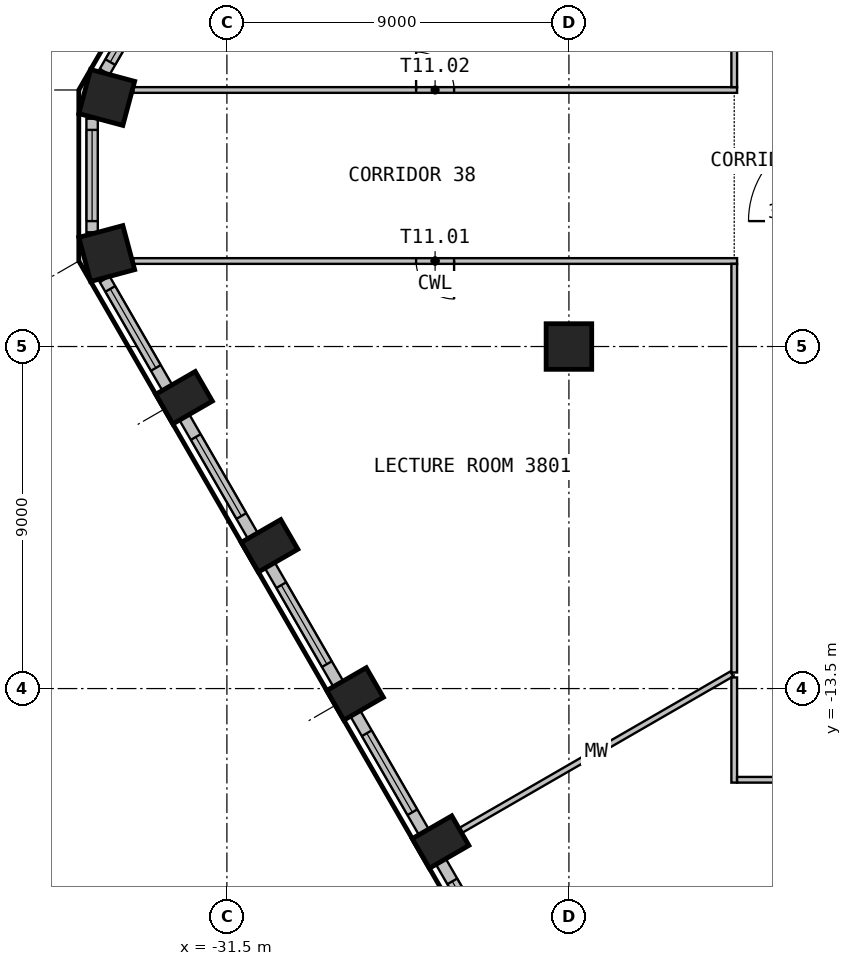
"""IFC4 building model, lengths in metres.
Left out: names, types, materials, properties, quantities, classifications, styles, units other than length and angle.
Written with IfcOpenShell. Run it as: python <this file> out.ifc"""

import sys

from ifc_helpers import new_model, si_unit, direction, frame, frame_2d, origin, origin_2d, place, context, subcontext, project, spatial, rectangle, circle, extrude, element, fill, save


model = new_model("IFC4")
c1 = context("Model", 3, precision=1e-05, world=origin(), true_north=direction((0.0, 1.0)))
c2 = subcontext(c1, "Body", "Model", "MODEL_VIEW")
j1 = project(units=[si_unit("LENGTHUNIT", "METRE"), si_unit("PLANEANGLEUNIT", "RADIAN")], contexts=[c1])
p1 = place(None, origin())
s1 = spatial("IfcSite", under=j1, at=p1, CompositionType="ELEMENT")
p2 = place(p1, origin())
s2 = spatial("IfcBuilding", under=s1, at=p2, CompositionType="ELEMENT")
p3 = place(p2, frame((0.0, 0.0, 156.0)))
s3 = spatial("IfcBuildingStorey", under=s2, at=p3, CompositionType="ELEMENT", Elevation=156.0)
for number, where, z_axis, x_axis in (
    (1, (-34.662, 2.053, 0.0), (0.0, 0.0, 1.0), (-0.259, -0.966, 0.0)),
    (2, (-34.662, -2.053, 0.0), (0.0, 0.0, 1.0), (0.259, -0.966, 0.0)),
):
    element("IfcColumn", number, at=place(p3, frame(where, z_axis=z_axis, x_axis=x_axis)), inside=s3, PredefinedType="COLUMN", context=c2, shape_type="SweptSolid", body=[
        extrude(rectangle(XDim=1.2, YDim=1.2, at=origin_2d()), origin(), (0.0, 0.0, 1.0), 3.575),
    ])
for number, where, z_axis, x_axis in (
    (3, (-32.627, -5.847, 0.0), (0.0, 0.0, 1.0), (0.5, -0.866, 0.0)),
    (4, (-30.377, -9.744, 0.0), (0.0, 0.0, 1.0), (0.5, -0.866, 0.0)),
    (5, (-28.127, -13.641, 0.0), (0.0, 0.0, 1.0), (0.5, -0.866, 0.0)),
    (6, (-25.877, -17.539, 0.0), (0.0, 0.0, 1.0), (0.5, -0.866, 0.0)),
):
    element("IfcColumn", number, at=place(p3, frame(where, z_axis=z_axis, x_axis=x_axis)), inside=s3, PredefinedType="COLUMN", context=c2, shape_type="SweptSolid", body=[
        extrude(rectangle(XDim=0.9, YDim=1.2, at=origin_2d()), origin(), (0.0, 0.0, 1.0), 3.575),
    ])
p4 = place(p3, frame((-22.5, -4.5, 0.0), z_axis=(0.0, 0.0, 1.0), x_axis=(1.0, 0.0, 0.0)))
e7 = element("IfcColumn", 7, at=p4, inside=s3, PredefinedType="COLUMN", context=c2, shape_type="SweptSolid", body=[
    extrude(circle(Radius=0.6, at=origin_2d()), origin(), (0.0, 0.0, 1.0), 3.575),
])
p5 = place(p3, frame((-33.069, 5.582, 0.0), z_axis=(0.0, 0.0, 1.0), x_axis=(-0.499981217486, -0.866036247602, 0.0)))
e8 = element("IfcWall", 8, at=p5, inside=s3, PredefinedType="SOLIDWALL", context=c2, shape_type="SweptSolid", body=[
    extrude(rectangle(XDim=3.294, YDim=0.3, at=frame_2d((1.647, 0.0))), origin(), (0.0, 0.0, 1.0), 3.575),
])
p6 = place(p5, frame((0.6, 0.0, 0.9)))
e9 = element("IfcOpeningElement", 9, at=p6, cuts=e8, PredefinedType="OPENING", context=c2, shape_type="SweptSolid", body=[
    extrude(rectangle(XDim=2.4, YDim=2.1, at=frame_2d((1.2, 1.05))), frame((0.0, 0.16, 0.0), z_axis=(0.0, -1.0, 0.0), x_axis=(1.0, 0.0, 0.0)), (0.0, 0.0, 1.0), 0.32),
])
p7 = place(p3, frame((-35.047, 1.495, 0.0), z_axis=(0.0, 0.0, 1.0), x_axis=(0.0, -1.0, 0.0)))
e10 = element("IfcWall", 10, at=p7, inside=s3, PredefinedType="SOLIDWALL", context=c2, shape_type="SweptSolid", body=[
    extrude(rectangle(XDim=2.989, YDim=0.3, at=frame_2d((1.495, 0.0))), origin(), (0.0, 0.0, 1.0), 3.575),
])
p8 = place(p7, frame((0.295, 0.0, 0.9)))
e11 = element("IfcOpeningElement", 11, at=p8, cuts=e10, PredefinedType="OPENING", context=c2, shape_type="SweptSolid", body=[
    extrude(rectangle(XDim=2.4, YDim=2.1, at=frame_2d((1.2, 1.05))), frame((0.0, 0.16, 0.0), z_axis=(0.0, -1.0, 0.0), x_axis=(1.0, 0.0, 0.0)), (0.0, 0.0, 1.0), 0.32),
])
p9 = place(p3, frame((-34.716, -2.729, 0.0), z_axis=(0.0, 0.0, 1.0), x_axis=(0.499981217486, -0.866036247602, 0.0)))
e12 = element("IfcWall", 12, at=p9, inside=s3, PredefinedType="SOLIDWALL", context=c2, shape_type="SweptSolid", body=[
    extrude(rectangle(XDim=3.294, YDim=0.3, at=frame_2d((1.647, 0.0))), origin(), (0.0, 0.0, 1.0), 3.575),
])
p10 = place(p9, frame((0.295, 0.0, 0.9)))
e13 = element("IfcOpeningElement", 13, at=p10, cuts=e12, PredefinedType="OPENING", context=c2, shape_type="SweptSolid", body=[
    extrude(rectangle(XDim=2.4, YDim=2.1, at=frame_2d((1.2, 1.05))), frame((0.0, 0.16, 0.0), z_axis=(0.0, -1.0, 0.0), x_axis=(1.0, 0.0, 0.0)), (0.0, 0.0, 1.0), 0.32),
])
p11 = place(p3, frame((-32.619, -6.362, 0.0), z_axis=(0.0, 0.0, 1.0), x_axis=(0.500027802648, -0.866009351323, 0.0)))
e14 = element("IfcWall", 14, at=p11, inside=s3, PredefinedType="SOLIDWALL", context=c2, shape_type="SweptSolid", body=[
    extrude(rectangle(XDim=3.599, YDim=0.3, at=frame_2d((1.799, 0.0))), origin(), (0.0, 0.0, 1.0), 3.575),
])
p12 = place(p11, frame((0.6, 0.0, 0.9)))
e15 = element("IfcOpeningElement", 15, at=p12, cuts=e14, PredefinedType="OPENING", context=c2, shape_type="SweptSolid", body=[
    extrude(rectangle(XDim=2.4, YDim=2.1, at=frame_2d((1.2, 1.05))), frame((0.0, 0.16, 0.0), z_axis=(0.0, -1.0, 0.0), x_axis=(1.0, 0.0, 0.0)), (0.0, 0.0, 1.0), 0.32),
])
p13 = place(p3, frame((-30.369, -10.26, 0.0), z_axis=(0.0, 0.0, 1.0), x_axis=(0.500027802648, -0.866009351323, 0.0)))
e16 = element("IfcWall", 16, at=p13, inside=s3, PredefinedType="SOLIDWALL", context=c2, shape_type="SweptSolid", body=[
    extrude(rectangle(XDim=3.599, YDim=0.3, at=frame_2d((1.799, 0.0))), origin(), (0.0, 0.0, 1.0), 3.575),
])
p14 = place(p13, frame((0.6, 0.0, 0.9)))
e17 = element("IfcOpeningElement", 17, at=p14, cuts=e16, PredefinedType="OPENING", context=c2, shape_type="SweptSolid", body=[
    extrude(rectangle(XDim=2.4, YDim=2.1, at=frame_2d((1.2, 1.05))), frame((0.0, 0.16, 0.0), z_axis=(0.0, -1.0, 0.0), x_axis=(1.0, 0.0, 0.0)), (0.0, 0.0, 1.0), 0.32),
])
p15 = place(p3, frame((-28.119, -14.156, 0.0), z_axis=(0.0, 0.0, 1.0), x_axis=(0.500027802648, -0.866009351323, 0.0)))
e18 = element("IfcWall", 18, at=p15, inside=s3, PredefinedType="SOLIDWALL", context=c2, shape_type="SweptSolid", body=[
    extrude(rectangle(XDim=3.599, YDim=0.3, at=frame_2d((1.799, 0.0))), origin(), (0.0, 0.0, 1.0), 3.575),
])
p16 = place(p15, frame((0.6, 0.0, 0.9)))
e19 = element("IfcOpeningElement", 19, at=p16, cuts=e18, PredefinedType="OPENING", context=c2, shape_type="SweptSolid", body=[
    extrude(rectangle(XDim=2.4, YDim=2.1, at=frame_2d((1.2, 1.05))), frame((0.0, 0.16, 0.0), z_axis=(0.0, -1.0, 0.0), x_axis=(1.0, 0.0, 0.0)), (0.0, 0.0, 1.0), 0.32),
])
p17 = place(p3, frame((-25.869, -18.054, 0.0), z_axis=(0.0, 0.0, 1.0), x_axis=(0.500027802648, -0.866009351323, 0.0)))
e20 = element("IfcWall", 20, at=p17, inside=s3, PredefinedType="SOLIDWALL", context=c2, shape_type="SweptSolid", body=[
    extrude(rectangle(XDim=3.599, YDim=0.3, at=frame_2d((1.799, 0.0))), origin(), (0.0, 0.0, 1.0), 3.575),
])
p18 = place(p17, frame((0.6, 0.0, 0.9)))
e21 = element("IfcOpeningElement", 21, at=p18, cuts=e20, PredefinedType="OPENING", context=c2, shape_type="SweptSolid", body=[
    extrude(rectangle(XDim=2.4, YDim=2.1, at=frame_2d((1.2, 1.05))), frame((0.0, 0.16, 0.0), z_axis=(0.0, -1.0, 0.0), x_axis=(1.0, 0.0, 0.0)), (0.0, 0.0, 1.0), 0.32),
])
p19 = place(p3, frame((-18.075, -2.25, 0.0), z_axis=(0.0, 0.0, 1.0), x_axis=(-1.0, 0.0, 0.0)))
e22 = element("IfcWall", 22, at=p19, inside=s3, PredefinedType="PARTITIONING", context=c2, shape_type="SweptSolid", body=[
    extrude(rectangle(XDim=15.893, YDim=0.15, at=frame_2d((7.946, 0.0))), origin(), (0.0, 0.0, 1.0), 3.575),
])
p20 = place(p19, frame((7.446, 0.0, 0.0)))
e23 = element("IfcOpeningElement", 23, at=p20, cuts=e22, PredefinedType="OPENING", context=c2, shape_type="SweptSolid", body=[
    extrude(rectangle(XDim=1.0, YDim=2.1, at=frame_2d((0.5, 1.05))), frame((0.0, 0.085, 0.0), z_axis=(0.0, -1.0, 0.0), x_axis=(1.0, 0.0, 0.0)), (0.0, 0.0, 1.0), 0.17),
])
p21 = place(p3, frame((-33.968, 2.25, 0.0), z_axis=(0.0, 0.0, 1.0), x_axis=(1.0, 0.0, 0.0)))
e24 = element("IfcWall", 24, at=p21, inside=s3, PredefinedType="PARTITIONING", context=c2, shape_type="SweptSolid", body=[
    extrude(rectangle(XDim=15.893, YDim=0.15, at=frame_2d((7.946, 0.0))), origin(), (0.0, 0.0, 1.0), 3.575),
])
p22 = place(p21, frame((7.446, 0.0, 0.0)))
e25 = element("IfcOpeningElement", 25, at=p22, cuts=e24, PredefinedType="OPENING", context=c2, shape_type="SweptSolid", body=[
    extrude(rectangle(XDim=1.0, YDim=2.1, at=frame_2d((0.5, 1.05))), frame((0.0, 0.085, 0.0), z_axis=(0.0, -1.0, 0.0), x_axis=(1.0, 0.0, 0.0)), (0.0, 0.0, 1.0), 0.17),
])
p23 = place(p3, frame((-18.215, -13.115, 0.0), z_axis=(0.0, 0.0, 1.0), x_axis=(-0.866039823271, -0.499975023885, 0.0)))
e26 = element("IfcWall", 26, at=p23, inside=s3, PredefinedType="MOVABLE", context=c2, shape_type="SweptSolid", body=[
    extrude(rectangle(XDim=8.228, YDim=0.15, at=frame_2d((4.114, 0.0))), origin(), (0.0, 0.0, 1.0), 3.575),
])
p24 = place(p3, frame((-12.217, -15.953, 0.0), z_axis=(0.0, 0.0, 1.0), x_axis=(-0.707096863632, -0.707116698602, 0.0)))
e27 = element("IfcWall", 27, at=p24, inside=s3, PredefinedType="MOVABLE", context=c2, shape_type="SweptSolid", body=[
    extrude(rectangle(XDim=12.309, YDim=0.15, at=frame_2d((6.154, 0.0))), origin(), (0.0, 0.0, 1.0), 3.575),
])
p25 = place(p3, frame((-18.15, -13.207, 0.0), z_axis=(0.0, 0.0, 1.0), x_axis=(0.0, -1.0, 0.0)))
e28 = element("IfcWall", 28, at=p25, inside=s3, PredefinedType="PARTITIONING", context=c2, shape_type="SweptSolid", body=[
    extrude(rectangle(XDim=2.768, YDim=0.15, at=frame_2d((1.384, 0.0))), origin(), (0.0, 0.0, 1.0), 3.575),
])
p26 = place(p3, frame((-18.075, -15.9, 0.0), z_axis=(0.0, 0.0, 1.0), x_axis=(1.0, 0.0, 0.0)))
e29 = element("IfcWall", 29, at=p26, inside=s3, PredefinedType="PARTITIONING", context=c2, shape_type="SweptSolid", body=[
    extrude(rectangle(XDim=5.736, YDim=0.15, at=frame_2d((2.868, 0.0))), origin(), (0.0, 0.0, 1.0), 3.575),
])
p27 = place(p26, frame((2.368, 0.0, 0.0)))
e30 = element("IfcOpeningElement", 30, at=p27, cuts=e29, PredefinedType="OPENING", context=c2, shape_type="SweptSolid", body=[
    extrude(rectangle(XDim=1.0, YDim=2.1, at=frame_2d((0.5, 1.05))), frame((0.0, 0.085, 0.0), z_axis=(0.0, -1.0, 0.0), x_axis=(1.0, 0.0, 0.0)), (0.0, 0.0, 1.0), 0.17),
])
p28 = place(p3, frame((-18.15, -2.325, 0.0), z_axis=(0.0, 0.0, 1.0), x_axis=(0.0, -1.0, 0.0)))
e31 = element("IfcWall", 31, at=p28, inside=s3, PredefinedType="PARTITIONING", context=c2, shape_type="SweptSolid", body=[
    extrude(rectangle(XDim=10.752, YDim=0.15, at=frame_2d((5.376, 0.0))), origin(), (0.0, 0.0, 1.0), 3.575),
])
p29 = place(p3, frame((-18.15, 15.975, 0.0), z_axis=(0.0, 0.0, 1.0), x_axis=(0.0, -1.0, 0.0)))
e32 = element("IfcWall", 32, at=p29, inside=s3, PredefinedType="PARTITIONING", context=c2, shape_type="SweptSolid", body=[
    extrude(rectangle(XDim=13.65, YDim=0.15, at=frame_2d((6.825, 0.0))), origin(), (0.0, 0.0, 1.0), 3.575),
])
p30 = place(p6, origin())
e33 = element("IfcWindow", 33, at=p30, inside=s3, PartitioningType="SINGLE_PANEL", PredefinedType="WINDOW", context=c2, shape_type="SweptSolid", body=[
    extrude(rectangle(XDim=2.4, YDim=2.1, at=frame_2d((1.2, 1.05))), frame((0.0, 0.03, 0.0), z_axis=(0.0, -1.0, 0.0), x_axis=(1.0, 0.0, 0.0)), (0.0, 0.0, 1.0), 0.06),
])
fill(e9, e33)
p31 = place(p8, origin())
e34 = element("IfcWindow", 34, at=p31, inside=s3, PartitioningType="SINGLE_PANEL", PredefinedType="WINDOW", context=c2, shape_type="SweptSolid", body=[
    extrude(rectangle(XDim=2.4, YDim=2.1, at=frame_2d((1.2, 1.05))), frame((0.0, 0.03, 0.0), z_axis=(0.0, -1.0, 0.0), x_axis=(1.0, 0.0, 0.0)), (0.0, 0.0, 1.0), 0.06),
])
fill(e11, e34)
p32 = place(p10, origin())
e35 = element("IfcWindow", 35, at=p32, inside=s3, PartitioningType="SINGLE_PANEL", PredefinedType="WINDOW", context=c2, shape_type="SweptSolid", body=[
    extrude(rectangle(XDim=2.4, YDim=2.1, at=frame_2d((1.2, 1.05))), frame((0.0, 0.03, 0.0), z_axis=(0.0, -1.0, 0.0), x_axis=(1.0, 0.0, 0.0)), (0.0, 0.0, 1.0), 0.06),
])
fill(e13, e35)
p33 = place(p12, origin())
e36 = element("IfcWindow", 36, at=p33, inside=s3, PartitioningType="SINGLE_PANEL", PredefinedType="WINDOW", context=c2, shape_type="SweptSolid", body=[
    extrude(rectangle(XDim=2.4, YDim=2.1, at=frame_2d((1.2, 1.05))), frame((0.0, 0.03, 0.0), z_axis=(0.0, -1.0, 0.0), x_axis=(1.0, 0.0, 0.0)), (0.0, 0.0, 1.0), 0.06),
])
fill(e15, e36)
p34 = place(p14, origin())
e37 = element("IfcWindow", 37, at=p34, inside=s3, PartitioningType="SINGLE_PANEL", PredefinedType="WINDOW", context=c2, shape_type="SweptSolid", body=[
    extrude(rectangle(XDim=2.4, YDim=2.1, at=frame_2d((1.2, 1.05))), frame((0.0, 0.03, 0.0), z_axis=(0.0, -1.0, 0.0), x_axis=(1.0, 0.0, 0.0)), (0.0, 0.0, 1.0), 0.06),
])
fill(e17, e37)
p35 = place(p16, origin())
e38 = element("IfcWindow", 38, at=p35, inside=s3, PartitioningType="SINGLE_PANEL", PredefinedType="WINDOW", context=c2, shape_type="SweptSolid", body=[
    extrude(rectangle(XDim=2.4, YDim=2.1, at=frame_2d((1.2, 1.05))), frame((0.0, 0.03, 0.0), z_axis=(0.0, -1.0, 0.0), x_axis=(1.0, 0.0, 0.0)), (0.0, 0.0, 1.0), 0.06),
])
fill(e19, e38)
p36 = place(p18, origin())
e39 = element("IfcWindow", 39, at=p36, inside=s3, PartitioningType="SINGLE_PANEL", PredefinedType="WINDOW", context=c2, shape_type="SweptSolid", body=[
    extrude(rectangle(XDim=2.4, YDim=2.1, at=frame_2d((1.2, 1.05))), frame((0.0, 0.03, 0.0), z_axis=(0.0, -1.0, 0.0), x_axis=(1.0, 0.0, 0.0)), (0.0, 0.0, 1.0), 0.06),
])
fill(e21, e39)
p37 = place(p20, origin())
e40 = element("IfcDoor", 40, at=p37, inside=s3, OperationType="SINGLE_SWING_RIGHT", PredefinedType="DOOR", context=c2, shape_type="SweptSolid", body=[
    extrude(rectangle(XDim=1.0, YDim=2.1, at=frame_2d((0.5, 1.05))), frame((0.0, 0.025, 0.0), z_axis=(0.0, -1.0, 0.0), x_axis=(1.0, 0.0, 0.0)), (0.0, 0.0, 1.0), 0.05),
])
fill(e23, e40)
p38 = place(p22, origin())
e41 = element("IfcDoor", 41, at=p38, inside=s3, OperationType="SINGLE_SWING_LEFT", PredefinedType="DOOR", context=c2, shape_type="SweptSolid", body=[
    extrude(rectangle(XDim=1.0, YDim=2.1, at=frame_2d((0.5, 1.05))), frame((0.0, 0.025, 0.0), z_axis=(0.0, -1.0, 0.0), x_axis=(1.0, 0.0, 0.0)), (0.0, 0.0, 1.0), 0.05),
])
fill(e25, e41)
save(model, sys.argv[1])
